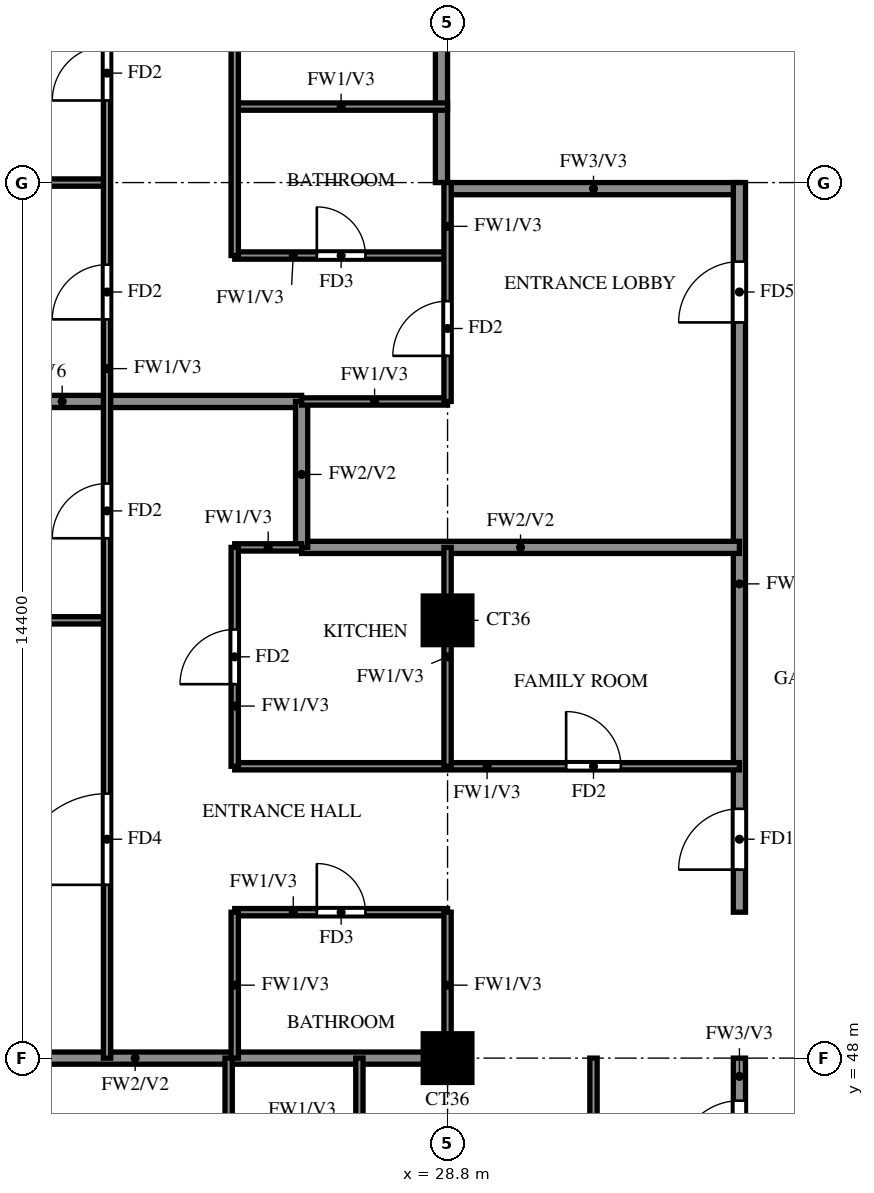
"""IFC4 building model, lengths in metres.
Left out: names, types, materials, properties, quantities, classifications, styles, units other than length and angle.
Written with IfcOpenShell. Run it as: python <this file> out.ifc"""

import sys

from ifc_helpers import new_model, si_unit, direction, frame, frame_2d, origin, origin_2d, place, context, subcontext, project, spatial, rectangle, extrude, source, transform, mapped, element, fill, save


model = new_model("IFC4")
c1 = context("Model", 3, precision=1e-05, world=origin(), true_north=direction((0.0, 1.0)))
c2 = subcontext(c1, "Body", "Model", "MODEL_VIEW")
j1 = project(units=[si_unit("LENGTHUNIT", "METRE"), si_unit("PLANEANGLEUNIT", "RADIAN")], contexts=[c1])
p1 = place(None, origin())
s1 = spatial("IfcSite", under=j1, at=p1, CompositionType="ELEMENT")
p2 = place(p1, origin())
s2 = spatial("IfcBuilding", under=s1, at=p2, CompositionType="ELEMENT")
p3 = place(p2, frame((0.0, 0.0, 239.5)))
s3 = spatial("IfcBuildingStorey", under=s2, at=p3, CompositionType="ELEMENT", Elevation=239.5)
m1 = source(origin(), c2, "Body", "SweptSolid", [
    extrude(rectangle(XDim=0.8, YDim=0.8, at=origin_2d()), origin(), (0.0, 0.0, 1.0), 3.22),
])
for number, where, z_axis, x_axis in (
    (1, (28.8, 48.0, 0.0), (0.0, 0.0, 1.0), (1.0, 0.0, 0.0)),
    (2, (28.8, 55.2, 0.0), (0.0, 0.0, 1.0), (1.0, 0.0, 0.0)),
):
    element("IfcColumn", number, at=place(p3, frame(where, z_axis=z_axis, x_axis=x_axis)), inside=s3, PredefinedType="COLUMN", context=c2, shape_type="MappedRepresentation", body=[
        mapped(m1, transform((0.0, 0.0, 0.0))),
    ])
p4 = place(p3, frame((28.8, 62.3, 0.0), z_axis=(0.0, 0.0, 1.0), x_axis=(1.0, 0.0, 0.0)))
e3 = element("IfcWall", 3, at=p4, inside=s3, PredefinedType="SOLIDWALL", context=c2, shape_type="SweptSolid", body=[
    extrude(rectangle(XDim=4.8, YDim=0.2, at=frame_2d((2.4, 0.0))), origin(), (0.0, 0.0, 1.0), 3.22),
])
p5 = place(p3, frame((28.7, 62.4, 0.0), z_axis=(0.0, 0.0, 1.0), x_axis=(0.0, 1.0, 0.0)))
e4 = element("IfcWall", 4, at=p5, inside=s3, PredefinedType="SOLIDWALL", context=c2, shape_type="SweptSolid", body=[
    extrude(rectangle(XDim=15.6, YDim=0.2, at=frame_2d((7.8, 0.0))), origin(), (0.0, 0.0, 1.0), 3.22),
])
p6 = place(p3, frame((33.6, 45.6, 0.0), z_axis=(0.0, 0.0, 1.0), x_axis=(0.0, 1.0, 0.0)))
e5 = element("IfcWall", 5, at=p6, inside=s3, PredefinedType="SOLIDWALL", context=c2, shape_type="SweptSolid", body=[
    extrude(rectangle(XDim=2.4, YDim=0.2, at=frame_2d((1.2, 0.0))), origin(), (0.0, 0.0, 1.0), 3.22),
])
p7 = place(p6, frame((0.7, 0.0, 0.0)))
e6 = element("IfcOpeningElement", 6, at=p7, cuts=e5, PredefinedType="OPENING", context=c2, shape_type="SweptSolid", body=[
    extrude(rectangle(XDim=1.0, YDim=2.1, at=frame_2d((0.5, 1.05))), frame((0.0, 0.11, 0.0), z_axis=(0.0, -1.0, 0.0), x_axis=(1.0, 0.0, 0.0)), (0.0, 0.0, 1.0), 0.22),
])
p8 = place(p3, frame((33.6, 50.4, 0.0), z_axis=(0.0, 0.0, 1.0), x_axis=(0.0, 1.0, 0.0)))
e7 = element("IfcWall", 7, at=p8, inside=s3, PredefinedType="SOLIDWALL", context=c2, shape_type="SweptSolid", body=[
    extrude(rectangle(XDim=12.0, YDim=0.2, at=frame_2d((6.0, 0.0))), origin(), (0.0, 0.0, 1.0), 3.22),
])
p9 = place(p8, frame((0.7, 0.0, 0.0)))
e8 = element("IfcOpeningElement", 8, at=p9, cuts=e7, PredefinedType="OPENING", context=c2, shape_type="SweptSolid", body=[
    extrude(rectangle(XDim=1.0, YDim=2.1, at=frame_2d((0.5, 1.05))), frame((0.0, 0.11, 0.0), z_axis=(0.0, -1.0, 0.0), x_axis=(1.0, 0.0, 0.0)), (0.0, 0.0, 1.0), 0.22),
])
p10 = place(p8, frame((9.7, 0.0, 0.0)))
e9 = element("IfcOpeningElement", 9, at=p10, cuts=e7, PredefinedType="OPENING", context=c2, shape_type="SweptSolid", body=[
    extrude(rectangle(XDim=1.0, YDim=2.1, at=frame_2d((0.5, 1.05))), frame((0.0, 0.11, 0.0), z_axis=(0.0, -1.0, 0.0), x_axis=(1.0, 0.0, 0.0)), (0.0, 0.0, 1.0), 0.22),
])
p11 = place(p3, frame((18.525, 48.0, 0.0), z_axis=(0.0, 0.0, 1.0), x_axis=(1.0, 0.0, 0.0)))
e10 = element("IfcWall", 10, at=p11, inside=s3, PredefinedType="SOLIDWALL", context=c2, shape_type="SweptSolid", body=[
    extrude(rectangle(XDim=10.275, YDim=0.2, at=frame_2d((5.138, 0.0))), origin(), (0.0, 0.0, 1.0), 3.22),
])
p12 = place(p3, frame((26.4, 56.4, 0.0), z_axis=(0.0, 0.0, 1.0), x_axis=(1.0, 0.0, 0.0)))
e11 = element("IfcWall", 11, at=p12, inside=s3, PredefinedType="SOLIDWALL", context=c2, shape_type="SweptSolid", body=[
    extrude(rectangle(XDim=7.2, YDim=0.2, at=frame_2d((3.6, 0.0))), origin(), (0.0, 0.0, 1.0), 3.22),
])
p13 = place(p3, frame((18.525, 58.8, 0.0), z_axis=(0.0, 0.0, 1.0), x_axis=(1.0, 0.0, 0.0)))
e12 = element("IfcWall", 12, at=p13, inside=s3, PredefinedType="SOLIDWALL", context=c2, shape_type="SweptSolid", body=[
    extrude(rectangle(XDim=7.875, YDim=0.2, at=frame_2d((3.938, 0.0))), origin(), (0.0, 0.0, 1.0), 2.32),
])
p14 = place(p3, frame((26.4, 56.4, 0.0), z_axis=(0.0, 0.0, 1.0), x_axis=(0.0, 1.0, 0.0)))
e13 = element("IfcWall", 13, at=p14, inside=s3, PredefinedType="SOLIDWALL", context=c2, shape_type="SweptSolid", body=[
    extrude(rectangle(XDim=2.4, YDim=0.2, at=frame_2d((1.2, 0.0))), origin(), (0.0, 0.0, 1.0), 3.22),
])
p15 = place(p3, frame((25.3, 50.4, 0.0), z_axis=(0.0, 0.0, 1.0), x_axis=(1.0, 0.0, 0.0)))
e14 = element("IfcWall", 14, at=p15, inside=s3, PredefinedType="PARTITIONING", context=c2, shape_type="SweptSolid", body=[
    extrude(rectangle(XDim=3.5, YDim=0.12, at=frame_2d((1.75, 0.0))), origin(), (0.0, 0.0, 1.0), 3.22),
])
p16 = place(p15, frame((1.35, 0.0, 0.0)))
e15 = element("IfcOpeningElement", 15, at=p16, cuts=e14, PredefinedType="OPENING", context=c2, shape_type="SweptSolid", body=[
    extrude(rectangle(XDim=0.8, YDim=2.1, at=frame_2d((0.4, 1.05))), frame((0.0, 0.07, 0.0), z_axis=(0.0, -1.0, 0.0), x_axis=(1.0, 0.0, 0.0)), (0.0, 0.0, 1.0), 0.14),
])
p17 = place(p3, frame((25.3, 52.8, 0.0), z_axis=(0.0, 0.0, 1.0), x_axis=(1.0, 0.0, 0.0)))
e16 = element("IfcWall", 16, at=p17, inside=s3, PredefinedType="PARTITIONING", context=c2, shape_type="SweptSolid", body=[
    extrude(rectangle(XDim=8.3, YDim=0.12, at=frame_2d((4.15, 0.0))), origin(), (0.0, 0.0, 1.0), 3.22),
])
p18 = place(p17, frame((5.45, 0.0, 0.0)))
e17 = element("IfcOpeningElement", 17, at=p18, cuts=e16, PredefinedType="OPENING", context=c2, shape_type="SweptSolid", body=[
    extrude(rectangle(XDim=0.9, YDim=2.1, at=frame_2d((0.45, 1.05))), frame((0.0, 0.07, 0.0), z_axis=(0.0, -1.0, 0.0), x_axis=(1.0, 0.0, 0.0)), (0.0, 0.0, 1.0), 0.14),
])
p19 = place(p3, frame((18.525, 55.2, 0.0), z_axis=(0.0, 0.0, 1.0), x_axis=(1.0, 0.0, 0.0)))
e18 = element("IfcWall", 18, at=p19, inside=s3, PredefinedType="PARTITIONING", context=c2, shape_type="SweptSolid", body=[
    extrude(rectangle(XDim=4.675, YDim=0.12, at=frame_2d((2.337, 0.0))), origin(), (0.0, 0.0, 1.0), 3.22),
])
p20 = place(p3, frame((25.3, 56.4, 0.0), z_axis=(0.0, 0.0, 1.0), x_axis=(1.0, 0.0, 0.0)))
e19 = element("IfcWall", 19, at=p20, inside=s3, PredefinedType="PARTITIONING", context=c2, shape_type="SweptSolid", body=[
    extrude(rectangle(XDim=1.1, YDim=0.12, at=frame_2d((0.55, 0.0))), origin(), (0.0, 0.0, 1.0), 3.22),
])
p21 = place(p3, frame((26.4, 58.8, 0.0), z_axis=(0.0, 0.0, 1.0), x_axis=(1.0, 0.0, 0.0)))
e20 = element("IfcWall", 20, at=p21, inside=s3, PredefinedType="PARTITIONING", context=c2, shape_type="SweptSolid", body=[
    extrude(rectangle(XDim=2.4, YDim=0.12, at=frame_2d((1.2, 0.0))), origin(), (0.0, 0.0, 1.0), 3.22),
])
p22 = place(p3, frame((25.3, 61.2, 0.0), z_axis=(0.0, 0.0, 1.0), x_axis=(1.0, 0.0, 0.0)))
e21 = element("IfcWall", 21, at=p22, inside=s3, PredefinedType="PARTITIONING", context=c2, shape_type="SweptSolid", body=[
    extrude(rectangle(XDim=3.5, YDim=0.12, at=frame_2d((1.75, 0.0))), origin(), (0.0, 0.0, 1.0), 3.22),
])
p23 = place(p22, frame((1.35, 0.0, 0.0)))
e22 = element("IfcOpeningElement", 22, at=p23, cuts=e21, PredefinedType="OPENING", context=c2, shape_type="SweptSolid", body=[
    extrude(rectangle(XDim=0.8, YDim=2.1, at=frame_2d((0.4, 1.05))), frame((0.0, 0.07, 0.0), z_axis=(0.0, -1.0, 0.0), x_axis=(1.0, 0.0, 0.0)), (0.0, 0.0, 1.0), 0.14),
])
p24 = place(p3, frame((18.525, 62.4, 0.0), z_axis=(0.0, 0.0, 1.0), x_axis=(1.0, 0.0, 0.0)))
e23 = element("IfcWall", 23, at=p24, inside=s3, PredefinedType="PARTITIONING", context=c2, shape_type="SweptSolid", body=[
    extrude(rectangle(XDim=4.675, YDim=0.12, at=frame_2d((2.337, 0.0))), origin(), (0.0, 0.0, 1.0), 3.22),
])
p25 = place(p3, frame((25.3, 63.65, 0.0), z_axis=(0.0, 0.0, 1.0), x_axis=(1.0, 0.0, 0.0)))
e24 = element("IfcWall", 24, at=p25, inside=s3, PredefinedType="PARTITIONING", context=c2, shape_type="SweptSolid", body=[
    extrude(rectangle(XDim=3.5, YDim=0.12, at=frame_2d((1.75, 0.0))), origin(), (0.0, 0.0, 1.0), 3.22),
])
p26 = place(p3, frame((23.2, 48.0, 0.0), z_axis=(0.0, 0.0, 1.0), x_axis=(0.0, 1.0, 0.0)))
e25 = element("IfcWall", 25, at=p26, inside=s3, PredefinedType="PARTITIONING", context=c2, shape_type="SweptSolid", body=[
    extrude(rectangle(XDim=25.2, YDim=0.12, at=frame_2d((12.6, 0.0))), origin(), (0.0, 0.0, 1.0), 3.22),
])
p27 = place(p26, frame((2.85, 0.0, 0.0)))
e26 = element("IfcOpeningElement", 26, at=p27, cuts=e25, PredefinedType="OPENING", context=c2, shape_type="SweptSolid", body=[
    extrude(rectangle(XDim=1.5, YDim=2.1, at=frame_2d((0.75, 1.05))), frame((0.0, 0.07, 0.0), z_axis=(0.0, -1.0, 0.0), x_axis=(1.0, 0.0, 0.0)), (0.0, 0.0, 1.0), 0.14),
])
p28 = place(p26, frame((8.55, 0.0, 0.0)))
e27 = element("IfcOpeningElement", 27, at=p28, cuts=e25, PredefinedType="OPENING", context=c2, shape_type="SweptSolid", body=[
    extrude(rectangle(XDim=0.9, YDim=2.1, at=frame_2d((0.45, 1.05))), frame((0.0, 0.07, 0.0), z_axis=(0.0, -1.0, 0.0), x_axis=(1.0, 0.0, 0.0)), (0.0, 0.0, 1.0), 0.14),
])
p29 = place(p26, frame((12.15, 0.0, 0.0)))
e28 = element("IfcOpeningElement", 28, at=p29, cuts=e25, PredefinedType="OPENING", context=c2, shape_type="SweptSolid", body=[
    extrude(rectangle(XDim=0.9, YDim=2.1, at=frame_2d((0.45, 1.05))), frame((0.0, 0.07, 0.0), z_axis=(0.0, -1.0, 0.0), x_axis=(1.0, 0.0, 0.0)), (0.0, 0.0, 1.0), 0.14),
])
p30 = place(p26, frame((15.75, 0.0, 0.0)))
e29 = element("IfcOpeningElement", 29, at=p30, cuts=e25, PredefinedType="OPENING", context=c2, shape_type="SweptSolid", body=[
    extrude(rectangle(XDim=0.9, YDim=2.1, at=frame_2d((0.45, 1.05))), frame((0.0, 0.07, 0.0), z_axis=(0.0, -1.0, 0.0), x_axis=(1.0, 0.0, 0.0)), (0.0, 0.0, 1.0), 0.14),
])
p31 = place(p26, frame((19.35, 0.0, 0.0)))
e30 = element("IfcOpeningElement", 30, at=p31, cuts=e25, PredefinedType="OPENING", context=c2, shape_type="SweptSolid", body=[
    extrude(rectangle(XDim=0.9, YDim=2.1, at=frame_2d((0.45, 1.05))), frame((0.0, 0.07, 0.0), z_axis=(0.0, -1.0, 0.0), x_axis=(1.0, 0.0, 0.0)), (0.0, 0.0, 1.0), 0.14),
])
p32 = place(p26, frame((22.95, 0.0, 0.0)))
e31 = element("IfcOpeningElement", 31, at=p32, cuts=e25, PredefinedType="OPENING", context=c2, shape_type="SweptSolid", body=[
    extrude(rectangle(XDim=0.9, YDim=2.1, at=frame_2d((0.45, 1.05))), frame((0.0, 0.07, 0.0), z_axis=(0.0, -1.0, 0.0), x_axis=(1.0, 0.0, 0.0)), (0.0, 0.0, 1.0), 0.14),
])
p33 = place(p3, frame((25.2, 39.725, 0.0), z_axis=(0.0, 0.0, 1.0), x_axis=(0.0, 1.0, 0.0)))
e32 = element("IfcWall", 32, at=p33, inside=s3, PredefinedType="PARTITIONING", context=c2, shape_type="SweptSolid", body=[
    extrude(rectangle(XDim=8.275, YDim=0.12, at=frame_2d((4.137, 0.0))), origin(), (0.0, 0.0, 1.0), 3.22),
])
p34 = place(p33, frame((4.525, 0.0, 0.0)))
e33 = element("IfcOpeningElement", 33, at=p34, cuts=e32, PredefinedType="OPENING", context=c2, shape_type="SweptSolid", body=[
    extrude(rectangle(XDim=0.9, YDim=2.1, at=frame_2d((0.45, 1.05))), frame((0.0, 0.07, 0.0), z_axis=(0.0, -1.0, 0.0), x_axis=(1.0, 0.0, 0.0)), (0.0, 0.0, 1.0), 0.14),
])
p35 = place(p3, frame((25.3, 48.0, 0.0), z_axis=(0.0, 0.0, 1.0), x_axis=(0.0, 1.0, 0.0)))
e34 = element("IfcWall", 34, at=p35, inside=s3, PredefinedType="PARTITIONING", context=c2, shape_type="SweptSolid", body=[
    extrude(rectangle(XDim=2.4, YDim=0.12, at=frame_2d((1.2, 0.0))), origin(), (0.0, 0.0, 1.0), 3.22),
])
p36 = place(p3, frame((25.3, 52.8, 0.0), z_axis=(0.0, 0.0, 1.0), x_axis=(0.0, 1.0, 0.0)))
e35 = element("IfcWall", 35, at=p36, inside=s3, PredefinedType="PARTITIONING", context=c2, shape_type="SweptSolid", body=[
    extrude(rectangle(XDim=3.6, YDim=0.12, at=frame_2d((1.8, 0.0))), origin(), (0.0, 0.0, 1.0), 3.22),
])
p37 = place(p36, frame((1.35, 0.0, 0.0)))
e36 = element("IfcOpeningElement", 36, at=p37, cuts=e35, PredefinedType="OPENING", context=c2, shape_type="SweptSolid", body=[
    extrude(rectangle(XDim=0.9, YDim=2.1, at=frame_2d((0.45, 1.05))), frame((0.0, 0.07, 0.0), z_axis=(0.0, -1.0, 0.0), x_axis=(1.0, 0.0, 0.0)), (0.0, 0.0, 1.0), 0.14),
])
p38 = place(p3, frame((25.3, 61.2, 0.0), z_axis=(0.0, 0.0, 1.0), x_axis=(0.0, 1.0, 0.0)))
e37 = element("IfcWall", 37, at=p38, inside=s3, PredefinedType="PARTITIONING", context=c2, shape_type="SweptSolid", body=[
    extrude(rectangle(XDim=12.0, YDim=0.12, at=frame_2d((6.0, 0.0))), origin(), (0.0, 0.0, 1.0), 3.22),
])
p39 = place(p38, frame((4.45, 0.0, 0.0)))
e38 = element("IfcOpeningElement", 38, at=p39, cuts=e37, PredefinedType="OPENING", context=c2, shape_type="SweptSolid", body=[
    extrude(rectangle(XDim=0.9, YDim=2.1, at=frame_2d((0.45, 1.05))), frame((0.0, 0.07, 0.0), z_axis=(0.0, -1.0, 0.0), x_axis=(1.0, 0.0, 0.0)), (0.0, 0.0, 1.0), 0.14),
])
p40 = place(p38, frame((9.225, 0.0, 0.0)))
e39 = element("IfcOpeningElement", 39, at=p40, cuts=e37, PredefinedType="OPENING", context=c2, shape_type="SweptSolid", body=[
    extrude(rectangle(XDim=0.9, YDim=2.1, at=frame_2d((0.45, 1.05))), frame((0.0, 0.07, 0.0), z_axis=(0.0, -1.0, 0.0), x_axis=(1.0, 0.0, 0.0)), (0.0, 0.0, 1.0), 0.14),
])
for number, where, z_axis, x_axis in (
    (40, (27.35, 45.6, 0.0), (0.0, 0.0, 1.0), (0.0, 1.0, 0.0)),
    (41, (28.8, 48.0, 0.0), (0.0, 0.0, 1.0), (0.0, 1.0, 0.0)),
):
    element("IfcWall", number, at=place(p3, frame(where, z_axis=z_axis, x_axis=x_axis)), inside=s3, PredefinedType="PARTITIONING", context=c2, shape_type="SweptSolid", body=[
        extrude(rectangle(XDim=2.4, YDim=0.12, at=frame_2d((1.2, 0.0))), origin(), (0.0, 0.0, 1.0), 3.22),
    ])
p41 = place(p3, frame((28.8, 52.8, 0.0), z_axis=(0.0, 0.0, 1.0), x_axis=(0.0, 1.0, 0.0)))
e42 = element("IfcWall", 42, at=p41, inside=s3, PredefinedType="PARTITIONING", context=c2, shape_type="SweptSolid", body=[
    extrude(rectangle(XDim=3.6, YDim=0.12, at=frame_2d((1.8, 0.0))), origin(), (0.0, 0.0, 1.0), 3.22),
])
p42 = place(p3, frame((28.8, 58.8, 0.0), z_axis=(0.0, 0.0, 1.0), x_axis=(0.0, 1.0, 0.0)))
e43 = element("IfcWall", 43, at=p42, inside=s3, PredefinedType="PARTITIONING", context=c2, shape_type="SweptSolid", body=[
    extrude(rectangle(XDim=3.6, YDim=0.12, at=frame_2d((1.8, 0.0))), origin(), (0.0, 0.0, 1.0), 3.22),
])
p43 = place(p42, frame((0.75, 0.0, 0.0)))
e44 = element("IfcOpeningElement", 44, at=p43, cuts=e43, PredefinedType="OPENING", context=c2, shape_type="SweptSolid", body=[
    extrude(rectangle(XDim=0.9, YDim=2.1, at=frame_2d((0.45, 1.05))), frame((0.0, 0.07, 0.0), z_axis=(0.0, -1.0, 0.0), x_axis=(1.0, 0.0, 0.0)), (0.0, 0.0, 1.0), 0.14),
])
p44 = place(p3, frame((31.2, 45.6, 0.0), z_axis=(0.0, 0.0, 1.0), x_axis=(0.0, 1.0, 0.0)))
e45 = element("IfcWall", 45, at=p44, inside=s3, PredefinedType="PARTITIONING", context=c2, shape_type="SweptSolid", body=[
    extrude(rectangle(XDim=2.4, YDim=0.12, at=frame_2d((1.2, 0.0))), origin(), (0.0, 0.0, 1.0), 3.22),
])
p45 = place(p7, origin())
e46 = element("IfcDoor", 46, at=p45, inside=s3, OperationType="SINGLE_SWING_LEFT", PredefinedType="DOOR", context=c2, shape_type="SweptSolid", body=[
    extrude(rectangle(XDim=1.0, YDim=2.1, at=frame_2d((0.5, 1.05))), frame((0.0, 0.025, 0.0), z_axis=(0.0, -1.0, 0.0), x_axis=(1.0, 0.0, 0.0)), (0.0, 0.0, 1.0), 0.05),
])
fill(e6, e46)
p46 = place(p9, origin())
e47 = element("IfcDoor", 47, at=p46, inside=s3, OperationType="SINGLE_SWING_LEFT", PredefinedType="DOOR", context=c2, shape_type="SweptSolid", body=[
    extrude(rectangle(XDim=1.0, YDim=2.1, at=frame_2d((0.5, 1.05))), frame((0.0, 0.025, 0.0), z_axis=(0.0, -1.0, 0.0), x_axis=(1.0, 0.0, 0.0)), (0.0, 0.0, 1.0), 0.05),
])
fill(e8, e47)
p47 = place(p27, origin())
e48 = element("IfcDoor", 48, at=p47, inside=s3, OperationType="SINGLE_SWING_RIGHT", PredefinedType="DOOR", context=c2, shape_type="SweptSolid", body=[
    extrude(rectangle(XDim=1.5, YDim=2.1, at=frame_2d((0.75, 1.05))), frame((0.0, 0.025, 0.0), z_axis=(0.0, -1.0, 0.0), x_axis=(1.0, 0.0, 0.0)), (0.0, 0.0, 1.0), 0.05),
])
fill(e26, e48)
p48 = place(p28, origin())
e49 = element("IfcDoor", 49, at=p48, inside=s3, OperationType="SINGLE_SWING_LEFT", PredefinedType="DOOR", context=c2, shape_type="SweptSolid", body=[
    extrude(rectangle(XDim=0.9, YDim=2.1, at=frame_2d((0.45, 1.05))), frame((0.0, 0.025, 0.0), z_axis=(0.0, -1.0, 0.0), x_axis=(1.0, 0.0, 0.0)), (0.0, 0.0, 1.0), 0.05),
])
fill(e27, e49)
p49 = place(p16, origin())
e50 = element("IfcDoor", 50, at=p49, inside=s3, OperationType="SINGLE_SWING_LEFT", PredefinedType="DOOR", context=c2, shape_type="SweptSolid", body=[
    extrude(rectangle(XDim=0.8, YDim=2.1, at=frame_2d((0.4, 1.05))), frame((0.0, 0.025, 0.0), z_axis=(0.0, -1.0, 0.0), x_axis=(1.0, 0.0, 0.0)), (0.0, 0.0, 1.0), 0.05),
])
fill(e15, e50)
p50 = place(p37, origin())
e51 = element("IfcDoor", 51, at=p50, inside=s3, OperationType="SINGLE_SWING_RIGHT", PredefinedType="DOOR", context=c2, shape_type="SweptSolid", body=[
    extrude(rectangle(XDim=0.9, YDim=2.1, at=frame_2d((0.45, 1.05))), frame((0.0, 0.025, 0.0), z_axis=(0.0, -1.0, 0.0), x_axis=(1.0, 0.0, 0.0)), (0.0, 0.0, 1.0), 0.05),
])
fill(e36, e51)
p51 = place(p18, origin())
e52 = element("IfcDoor", 52, at=p51, inside=s3, OperationType="SINGLE_SWING_LEFT", PredefinedType="DOOR", context=c2, shape_type="SweptSolid", body=[
    extrude(rectangle(XDim=0.9, YDim=2.1, at=frame_2d((0.45, 1.05))), frame((0.0, 0.025, 0.0), z_axis=(0.0, -1.0, 0.0), x_axis=(1.0, 0.0, 0.0)), (0.0, 0.0, 1.0), 0.05),
])
fill(e17, e52)
p52 = place(p43, origin())
e53 = element("IfcDoor", 53, at=p52, inside=s3, OperationType="SINGLE_SWING_LEFT", PredefinedType="DOOR", context=c2, shape_type="SweptSolid", body=[
    extrude(rectangle(XDim=0.9, YDim=2.1, at=frame_2d((0.45, 1.05))), frame((0.0, 0.025, 0.0), z_axis=(0.0, -1.0, 0.0), x_axis=(1.0, 0.0, 0.0)), (0.0, 0.0, 1.0), 0.05),
])
fill(e44, e53)
p53 = place(p10, origin())
e54 = element("IfcDoor", 54, at=p53, inside=s3, OperationType="SINGLE_SWING_RIGHT", PredefinedType="DOOR", context=c2, shape_type="SweptSolid", body=[
    extrude(rectangle(XDim=1.0, YDim=2.1, at=frame_2d((0.5, 1.05))), frame((0.0, 0.025, 0.0), z_axis=(0.0, -1.0, 0.0), x_axis=(1.0, 0.0, 0.0)), (0.0, 0.0, 1.0), 0.05),
])
fill(e9, e54)
p54 = place(p29, origin())
e55 = element("IfcDoor", 55, at=p54, inside=s3, OperationType="SINGLE_SWING_LEFT", PredefinedType="DOOR", context=c2, shape_type="SweptSolid", body=[
    extrude(rectangle(XDim=0.9, YDim=2.1, at=frame_2d((0.45, 1.05))), frame((0.0, 0.025, 0.0), z_axis=(0.0, -1.0, 0.0), x_axis=(1.0, 0.0, 0.0)), (0.0, 0.0, 1.0), 0.05),
])
fill(e28, e55)
p55 = place(p30, origin())
e56 = element("IfcDoor", 56, at=p55, inside=s3, OperationType="SINGLE_SWING_LEFT", PredefinedType="DOOR", context=c2, shape_type="SweptSolid", body=[
    extrude(rectangle(XDim=0.9, YDim=2.1, at=frame_2d((0.45, 1.05))), frame((0.0, 0.025, 0.0), z_axis=(0.0, -1.0, 0.0), x_axis=(1.0, 0.0, 0.0)), (0.0, 0.0, 1.0), 0.05),
])
fill(e29, e56)
p56 = place(p23, origin())
e57 = element("IfcDoor", 57, at=p56, inside=s3, OperationType="SINGLE_SWING_RIGHT", PredefinedType="DOOR", context=c2, shape_type="SweptSolid", body=[
    extrude(rectangle(XDim=0.8, YDim=2.1, at=frame_2d((0.4, 1.05))), frame((0.0, 0.025, 0.0), z_axis=(0.0, -1.0, 0.0), x_axis=(1.0, 0.0, 0.0)), (0.0, 0.0, 1.0), 0.05),
])
fill(e22, e57)
save(model, sys.argv[1])
